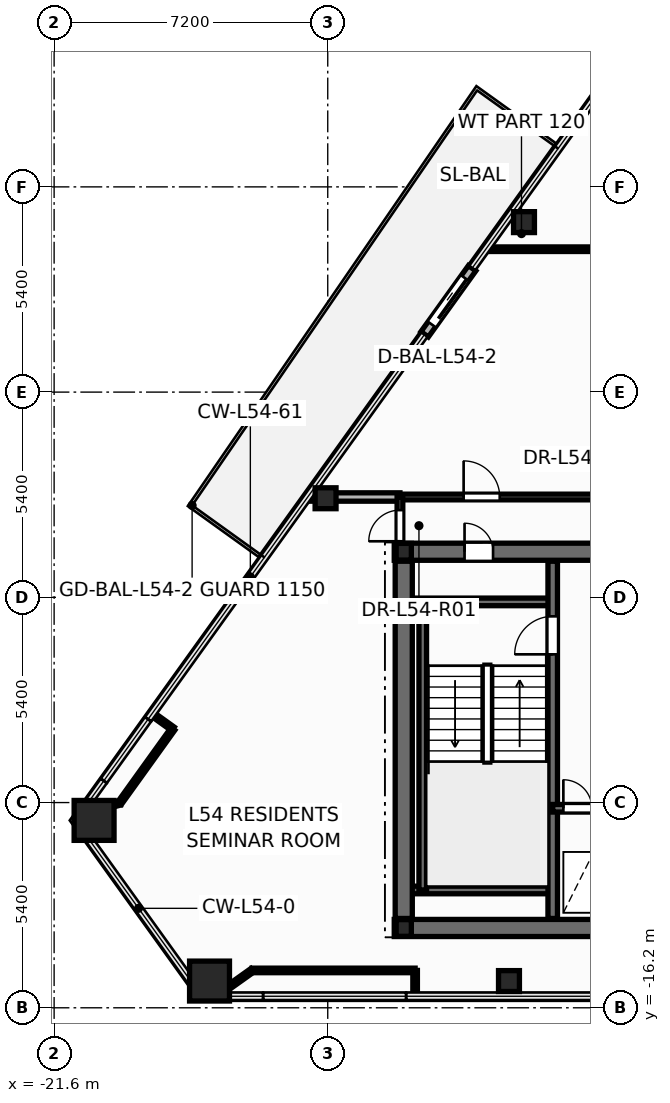
"""IFC4 building model, lengths in metres.
Left out: names, types, materials, properties, quantities, classifications, styles, units other than length and angle.
Written with IfcOpenShell. Run it as: python <this file> out.ifc"""

import sys

from ifc_helpers import new_model, si_unit, direction, frame, frame_2d, origin, origin_2d, place, context, subcontext, project, spatial, rectangle, hollow_rectangle, hollow_circle, i_section, extrude, element, fill, save


model = new_model("IFC4")
c1 = context("Model", 3, precision=1e-05, world=origin(), true_north=direction((0.0, 1.0)))
c2 = subcontext(c1, "Body", "Model", "MODEL_VIEW")
j1 = project(units=[si_unit("LENGTHUNIT", "METRE"), si_unit("PLANEANGLEUNIT", "RADIAN")], contexts=[c1])
p1 = place(None, origin())
s1 = spatial("IfcSite", under=j1, at=p1, CompositionType="ELEMENT")
p2 = place(p1, origin())
s2 = spatial("IfcBuilding", under=s1, at=p2, CompositionType="ELEMENT")
p3 = place(p2, frame((0.0, 0.0, 207.3)))
s3 = spatial("IfcBuildingStorey", under=s2, at=p3, CompositionType="ELEMENT", Elevation=207.3)
for number, where, z_axis, x_axis in (
    (1, (-20.548, -11.27, 0.0), (0.0, 0.0, 1.0), (1.0, 0.0, 0.0)),
    (2, (-17.511, -15.497, 0.0), (0.0, 0.0, 1.0), (1.0, 0.0, 0.0)),
):
    element("IfcColumn", number, at=place(p3, frame(where, z_axis=z_axis, x_axis=x_axis)), inside=s3, PredefinedType="COLUMN", context=c2, shape_type="SweptSolid", body=[
        extrude(hollow_rectangle(XDim=1.05, YDim=1.05, WallThickness=0.045, at=origin_2d()), origin(), (0.0, 0.0, 1.0), 3.6),
    ])
for number, where, z_axis, x_axis in (
    (3, (-9.631, -15.497, 0.0), (0.0, 0.0, 1.0), (1.0, 0.0, 0.0)),
    (4, (-9.236, 4.473, 0.0), (0.0, 0.0, 1.0), (1.0, 0.0, 0.0)),
    (5, (-14.457, -2.793, 0.0), (0.0, 0.0, 1.0), (1.0, 0.0, 0.0)),
):
    element("IfcColumn", number, at=place(p3, frame(where, z_axis=z_axis, x_axis=x_axis)), inside=s3, PredefinedType="COLUMN", context=c2, shape_type="SweptSolid", body=[
        extrude(hollow_circle(Radius=0.275, WallThickness=0.024, at=origin_2d()), origin(), (0.0, 0.0, 1.0), 3.6),
    ])
for number, where, z_axis, x_axis in (
    (6, (-12.4, -14.1, 0.0), (0.0, 0.0, 1.0), (1.0, 0.0, 0.0)),
    (7, (-12.4, -4.2, 0.0), (0.0, 0.0, 1.0), (1.0, 0.0, 0.0)),
):
    element("IfcColumn", number, at=place(p3, frame(where, z_axis=z_axis, x_axis=x_axis)), inside=s3, PredefinedType="COLUMN", context=c2, shape_type="SweptSolid", body=[
        extrude(i_section(OverallWidth=0.4, OverallDepth=0.44, WebThickness=0.028, FlangeThickness=0.04, at=origin_2d()), origin(), (0.0, 0.0, 1.0), 3.6),
    ])
p4 = place(p3, frame((-10.601, 3.259, -0.015), z_axis=(0.0, 0.0, 1.0), x_axis=(-0.583556118157, -0.812072815061, 0.0)))
e8 = element("IfcWall", 8, at=p4, inside=s3, PredefinedType="STANDARD", context=c2, shape_type="SweptSolid", body=[
    extrude(rectangle(XDim=2.14, YDim=0.24, at=frame_2d((1.07, 0.0))), origin(), (0.0, 0.0, 1.0), 2.802),
])
p5 = place(p4, frame((0.32, 0.0, 0.015)))
e9 = element("IfcOpeningElement", 9, at=p5, cuts=e8, PredefinedType="OPENING", context=c2, shape_type="SweptSolid", body=[
    extrude(rectangle(XDim=1.506, YDim=2.204, at=frame_2d((0.75, 1.102))), frame((0.0, 0.13, 0.0), z_axis=(0.0, -1.0, 0.0), x_axis=(1.0, 0.0, 0.0)), (0.0, 0.0, 1.0), 0.26),
])
p6 = place(p3, frame((-12.65, -14.1, 0.0), z_axis=(0.0, 0.0, 1.0), x_axis=(1.0, 0.0, 0.0)))
e10 = element("IfcWall", 10, at=p6, inside=s3, PredefinedType="SHEAR", context=c2, shape_type="SweptSolid", body=[
    extrude(rectangle(XDim=25.3, YDim=0.45, at=frame_2d((12.65, 0.0))), origin(), (0.0, 0.0, 1.0), 3.6),
])
p7 = place(p3, frame((-12.65, -4.2, 0.0), z_axis=(0.0, 0.0, 1.0), x_axis=(1.0, 0.0, 0.0)))
e11 = element("IfcWall", 11, at=p7, inside=s3, PredefinedType="SHEAR", context=c2, shape_type="SweptSolid", body=[
    extrude(rectangle(XDim=25.3, YDim=0.45, at=frame_2d((12.65, 0.0))), origin(), (0.0, 0.0, 1.0), 3.6),
])
p8 = place(p7, frame((1.85, 0.0, 0.0)))
e12 = element("IfcOpeningElement", 12, at=p8, cuts=e11, PredefinedType="OPENING", context=c2, shape_type="SweptSolid", body=[
    extrude(rectangle(XDim=0.756, YDim=2.054, at=frame_2d((0.375, 1.027))), frame((0.0, 0.235, 0.0), z_axis=(0.0, -1.0, 0.0), x_axis=(1.0, 0.0, 0.0)), (0.0, 0.0, 1.0), 0.47),
])
p9 = place(p7, frame((22.65, 0.0, 0.0)))
e13 = element("IfcOpeningElement", 13, at=p9, cuts=e11, PredefinedType="OPENING", context=c2, shape_type="SweptSolid", body=[
    extrude(rectangle(XDim=0.756, YDim=2.054, at=frame_2d((0.375, 1.027))), frame((0.0, 0.235, 0.0), z_axis=(0.0, -1.0, 0.0), x_axis=(1.0, 0.0, 0.0)), (0.0, 0.0, 1.0), 0.47),
])
p10 = place(p7, frame((5.85, 0.0, 0.0)))
e14 = element("IfcOpeningElement", 14, at=p10, cuts=e11, PredefinedType="OPENING", context=c2, shape_type="SweptSolid", body=[
    extrude(rectangle(XDim=1.006, YDim=2.104, at=frame_2d((0.5, 1.052))), frame((0.0, 0.235, 0.0), z_axis=(0.0, -1.0, 0.0), x_axis=(1.0, 0.0, 0.0)), (0.0, 0.0, 1.0), 0.47),
])
p11 = place(p7, frame((10.35, 0.0, 0.0)))
e15 = element("IfcOpeningElement", 15, at=p11, cuts=e11, PredefinedType="OPENING", context=c2, shape_type="SweptSolid", body=[
    extrude(rectangle(XDim=1.406, YDim=2.154, at=frame_2d((0.7, 1.077))), frame((0.0, 0.235, 0.0), z_axis=(0.0, -1.0, 0.0), x_axis=(1.0, 0.0, 0.0)), (0.0, 0.0, 1.0), 0.47),
])
p12 = place(p7, frame((18.45, 0.0, 0.0)))
e16 = element("IfcOpeningElement", 16, at=p12, cuts=e11, PredefinedType="OPENING", context=c2, shape_type="SweptSolid", body=[
    extrude(rectangle(XDim=1.006, YDim=2.104, at=frame_2d((0.5, 1.052))), frame((0.0, 0.235, 0.0), z_axis=(0.0, -1.0, 0.0), x_axis=(1.0, 0.0, 0.0)), (0.0, 0.0, 1.0), 0.47),
])
for number, where, z_axis, x_axis in (
    (17, (-12.35, -5.52, 0.0), (0.0, 0.0, 1.0), (1.0, 0.0, 0.0)),
    (18, (-12.35, -13.1, 0.0), (0.0, 0.0, 1.0), (1.0, 0.0, 0.0)),
):
    element("IfcWall", number, at=place(p3, frame(where, z_axis=z_axis, x_axis=x_axis)), inside=s3, PredefinedType="SOLIDWALL", context=c2, shape_type="SweptSolid", body=[
        extrude(rectangle(XDim=3.87, YDim=0.2, at=frame_2d((1.935, 0.0))), origin(), (0.0, 0.0, 1.0), 3.6),
    ])
p13 = place(p3, frame((-11.9, -13.1, 0.0), z_axis=(0.0, 0.0, 1.0), x_axis=(0.0, 1.0, 0.0)))
e19 = element("IfcWall", 19, at=p13, inside=s3, PredefinedType="SOLIDWALL", context=c2, shape_type="SweptSolid", body=[
    extrude(rectangle(XDim=7.58, YDim=0.2, at=frame_2d((3.79, 0.0))), origin(), (0.0, 0.0, 1.0), 3.6),
])
p14 = place(p3, frame((-8.48, -13.85, 0.0), z_axis=(0.0, 0.0, 1.0), x_axis=(0.0, 1.0, 0.0)))
e20 = element("IfcWall", 20, at=p14, inside=s3, PredefinedType="SHEAR", context=c2, shape_type="SweptSolid", body=[
    extrude(rectangle(XDim=9.4, YDim=0.25, at=frame_2d((4.7, 0.0))), origin(), (0.0, 0.0, 1.0), 3.6),
])
p15 = place(p14, frame((6.95, 0.0, 0.0)))
e21 = element("IfcOpeningElement", 21, at=p15, cuts=e20, PredefinedType="OPENING", context=c2, shape_type="SweptSolid", body=[
    extrude(rectangle(XDim=1.006, YDim=2.104, at=frame_2d((0.5, 1.052))), frame((0.0, 0.135, 0.0), z_axis=(0.0, -1.0, 0.0), x_axis=(1.0, 0.0, 0.0)), (0.0, 0.0, 1.0), 0.27),
])
p16 = place(p3, frame((-8.48, -10.95, 0.0), z_axis=(0.0, 0.0, 1.0), x_axis=(1.0, 0.0, 0.0)))
e22 = element("IfcWall", 22, at=p16, inside=s3, PredefinedType="SOLIDWALL", context=c2, shape_type="SweptSolid", body=[
    extrude(rectangle(XDim=3.36, YDim=0.2, at=frame_2d((1.68, 0.0))), origin(), (0.0, 0.0, 1.0), 3.6),
])
p17 = place(p16, frame((0.28, 0.0, 0.0)))
e23 = element("IfcOpeningElement", 23, at=p17, cuts=e22, PredefinedType="OPENING", context=c2, shape_type="SweptSolid", body=[
    extrude(rectangle(XDim=0.756, YDim=2.054, at=frame_2d((0.375, 1.027))), frame((0.0, 0.11, 0.0), z_axis=(0.0, -1.0, 0.0), x_axis=(1.0, 0.0, 0.0)), (0.0, 0.0, 1.0), 0.22),
])
p18 = place(p16, frame((1.85, 0.0, 0.0)))
e24 = element("IfcOpeningElement", 24, at=p18, cuts=e22, PredefinedType="OPENING", context=c2, shape_type="SweptSolid", body=[
    extrude(rectangle(XDim=1.106, YDim=2.104, at=frame_2d((0.55, 1.052))), frame((0.0, 0.11, 0.0), z_axis=(0.0, -1.0, 0.0), x_axis=(1.0, 0.0, 0.0)), (0.0, 0.0, 1.0), 0.22),
])
p19 = place(p3, frame((-12.4, -13.85, 0.0), z_axis=(0.0, 0.0, 1.0), x_axis=(0.0, 1.0, 0.0)))
e25 = element("IfcWall", 25, at=p19, inside=s3, PredefinedType="SHEAR", context=c2, shape_type="SweptSolid", body=[
    extrude(rectangle(XDim=9.4, YDim=0.45, at=frame_2d((4.7, 0.0))), origin(), (0.0, 0.0, 1.0), 3.6),
])
p20 = place(p3, frame((-12.5, -2.76, 0.0), z_axis=(0.0, 0.0, 1.0), x_axis=(1.0, 0.0, 0.0)))
e26 = element("IfcWall", 26, at=p20, inside=s3, PredefinedType="PARTITIONING", context=c2, shape_type="SweptSolid", body=[
    extrude(rectangle(XDim=12.16, YDim=0.15, at=frame_2d((6.08, 0.0))), origin(), (0.0, 0.0, 1.0), 2.32),
])
p21 = place(p20, frame((1.676, 0.0, 0.0)))
e27 = element("IfcOpeningElement", 27, at=p21, cuts=e26, PredefinedType="OPENING", context=c2, shape_type="SweptSolid", body=[
    extrude(rectangle(XDim=0.956, YDim=2.104, at=frame_2d((0.475, 1.052))), frame((0.0, 0.085, 0.0), z_axis=(0.0, -1.0, 0.0), x_axis=(1.0, 0.0, 0.0)), (0.0, 0.0, 1.0), 0.17),
])
p22 = place(p3, frame((-10.241, 3.76, 0.0), z_axis=(0.0, 0.0, 1.0), x_axis=(1.0, 0.0, 0.0)))
e28 = element("IfcWall", 28, at=p22, inside=s3, PredefinedType="PARTITIONING", context=c2, shape_type="SweptSolid", body=[
    extrude(rectangle(XDim=6.261, YDim=0.12, at=frame_2d((3.13, 0.0))), origin(), (0.0, 0.0, 1.0), 2.62),
])
p23 = place(p22, frame((4.586, 0.0, 0.0)))
e29 = element("IfcOpeningElement", 29, at=p23, cuts=e28, PredefinedType="OPENING", context=c2, shape_type="SweptSolid", body=[
    extrude(rectangle(XDim=0.926, YDim=2.104, at=frame_2d((0.46, 1.052))), frame((0.0, 0.07, 0.0), z_axis=(0.0, -1.0, 0.0), x_axis=(1.0, 0.0, 0.0)), (0.0, 0.0, 1.0), 0.14),
])
p24 = place(p3, frame((-16.389, -15.217, 0.0), z_axis=(0.0, 0.0, 1.0), x_axis=(1.0, 0.0, 0.0)))
e30 = element("IfcWall", 30, at=p24, inside=s3, PredefinedType="PARTITIONING", context=c2, shape_type="SweptSolid", body=[
    extrude(rectangle(XDim=4.288, YDim=0.12, at=frame_2d((2.144, 0.0))), origin(), (0.0, 0.0, 1.0), 3.345),
])
p25 = place(p3, frame((-14.926, -2.76, 0.0), z_axis=(0.0, 0.0, 1.0), x_axis=(1.0, 0.0, 0.0)))
e31 = element("IfcWall", 31, at=p25, inside=s3, PredefinedType="PARTITIONING", context=c2, shape_type="SweptSolid", body=[
    extrude(rectangle(XDim=2.426, YDim=0.22, at=frame_2d((1.213, 0.0))), origin(), (0.0, 0.0, 1.0), 2.62),
])
p26 = place(p3, frame((-18.473, -8.862, 0.0), z_axis=(0.0, 0.0, 1.0), x_axis=(-0.583631855745, -0.812018384619, 0.0)))
e32 = element("IfcWall", 32, at=p26, inside=s3, PredefinedType="PARTITIONING", context=c2, shape_type="SweptSolid", body=[
    extrude(rectangle(XDim=2.4, YDim=0.12, at=frame_2d((1.2, 0.0))), origin(), (0.0, 0.0, 1.0), 2.32),
])
p27 = place(p3, frame((-12.5, -4.24, 0.0), z_axis=(0.0, 0.0, 1.0), x_axis=(0.0, 1.0, 0.0)))
e33 = element("IfcWall", 33, at=p27, inside=s3, PredefinedType="PARTITIONING", context=c2, shape_type="SweptSolid", body=[
    extrude(rectangle(XDim=1.48, YDim=0.15, at=frame_2d((0.74, 0.0))), origin(), (0.0, 0.0, 1.0), 2.32),
])
p28 = place(p27, frame((0.315, 0.0, 0.0)))
e34 = element("IfcOpeningElement", 34, at=p28, cuts=e33, PredefinedType="OPENING", context=c2, shape_type="SweptSolid", body=[
    extrude(rectangle(XDim=0.826, YDim=2.104, at=frame_2d((0.41, 1.052))), frame((0.0, 0.085, 0.0), z_axis=(0.0, -1.0, 0.0), x_axis=(1.0, 0.0, 0.0)), (0.0, 0.0, 1.0), 0.17),
])
p29 = place(p3, frame((-17.085, -15.712, 0.0), z_axis=(0.0, 0.0, 1.0), x_axis=(0.814775258606, 0.579776920861, 0.0)))
e35 = element("IfcWall", 35, at=p29, inside=s3, PredefinedType="PARTITIONING", context=c2, shape_type="SweptSolid", body=[
    extrude(rectangle(XDim=0.854, YDim=0.12, at=frame_2d((0.427, 0.0))), origin(), (0.0, 0.0, 1.0), 2.787),
])
p30 = place(p3, frame((-19.874, -10.811, 0.0), z_axis=(0.0, 0.0, 1.0), x_axis=(-0.967403978064, -0.253238115667, 0.0)))
e36 = element("IfcWall", 36, at=p30, inside=s3, PredefinedType="PARTITIONING", context=c2, shape_type="SweptSolid", body=[
    extrude(rectangle(XDim=0.852, YDim=0.12, at=frame_2d((0.426, 0.0))), origin(), (0.0, 0.0, 1.0), 2.32),
])
p31 = place(p3, frame((-19.018, -8.471, 0.0), z_axis=(0.0, 0.0, 1.0), x_axis=(0.812031557065, -0.583613528227, 0.0)))
e37 = element("IfcWall", 37, at=p31, inside=s3, PredefinedType="PARTITIONING", context=c2, shape_type="SweptSolid", body=[
    extrude(rectangle(XDim=0.67, YDim=0.12, at=frame_2d((0.335, 0.0))), origin(), (0.0, 0.0, 1.0), 2.787),
])
p32 = place(p3, frame((-12.101, -15.217, 0.0), z_axis=(0.0, 0.0, 1.0), x_axis=(0.0, -1.0, 0.0)))
e38 = element("IfcWall", 38, at=p32, inside=s3, PredefinedType="PARTITIONING", context=c2, shape_type="SweptSolid", body=[
    extrude(rectangle(XDim=0.67, YDim=0.12, at=frame_2d((0.335, 0.0))), origin(), (0.0, 0.0, 1.0), 2.787),
])
p33 = place(p5, origin())
e39 = element("IfcDoor", 39, at=p33, inside=s3, OperationType="SLIDING_TO_RIGHT", PredefinedType="DOOR", context=c2, shape_type="SweptSolid", body=[
    extrude(rectangle(XDim=1.5, YDim=2.2, at=frame_2d((0.75, 1.1))), frame((0.0, 0.025, 0.0), z_axis=(0.0, -1.0, 0.0), x_axis=(1.0, 0.0, 0.0)), (0.0, 0.0, 1.0), 0.05),
])
fill(e9, e39)
p34 = place(p15, origin())
e40 = element("IfcDoor", 40, at=p34, inside=s3, OperationType="SINGLE_SWING_LEFT", PredefinedType="DOOR", context=c2, shape_type="SweptSolid", body=[
    extrude(rectangle(XDim=1.0, YDim=2.1, at=frame_2d((0.5, 1.05))), frame((0.0, 0.025, 0.0), z_axis=(0.0, -1.0, 0.0), x_axis=(1.0, 0.0, 0.0)), (0.0, 0.0, 1.0), 0.05),
])
fill(e21, e40)
p35 = place(p17, origin())
e41 = element("IfcDoor", 41, at=p35, inside=s3, OperationType="SINGLE_SWING_LEFT", PredefinedType="DOOR", context=c2, shape_type="SweptSolid", body=[
    extrude(rectangle(XDim=0.75, YDim=2.05, at=frame_2d((0.375, 1.025))), frame((0.0, 0.025, 0.0), z_axis=(0.0, -1.0, 0.0), x_axis=(1.0, 0.0, 0.0)), (0.0, 0.0, 1.0), 0.05),
])
fill(e23, e41)
p36 = place(p8, origin())
e42 = element("IfcDoor", 42, at=p36, inside=s3, OperationType="SINGLE_SWING_LEFT", PredefinedType="DOOR", context=c2, shape_type="SweptSolid", body=[
    extrude(rectangle(XDim=0.75, YDim=2.05, at=frame_2d((0.375, 1.025))), frame((0.0, 0.025, 0.0), z_axis=(0.0, -1.0, 0.0), x_axis=(1.0, 0.0, 0.0)), (0.0, 0.0, 1.0), 0.05),
])
fill(e12, e42)
p37 = place(p28, origin())
e43 = element("IfcDoor", 43, at=p37, inside=s3, OperationType="SINGLE_SWING_LEFT", PredefinedType="DOOR", context=c2, shape_type="SweptSolid", body=[
    extrude(rectangle(XDim=0.82, YDim=2.1, at=frame_2d((0.41, 1.05))), frame((0.0, 0.025, 0.0), z_axis=(0.0, -1.0, 0.0), x_axis=(1.0, 0.0, 0.0)), (0.0, 0.0, 1.0), 0.05),
])
fill(e34, e43)
p38 = place(p21, origin())
e44 = element("IfcDoor", 44, at=p38, inside=s3, OperationType="SINGLE_SWING_LEFT", PredefinedType="DOOR", context=c2, shape_type="SweptSolid", body=[
    extrude(rectangle(XDim=0.95, YDim=2.1, at=frame_2d((0.475, 1.05))), frame((0.0, 0.025, 0.0), z_axis=(0.0, -1.0, 0.0), x_axis=(1.0, 0.0, 0.0)), (0.0, 0.0, 1.0), 0.05),
])
fill(e27, e44)
save(model, sys.argv[1])
